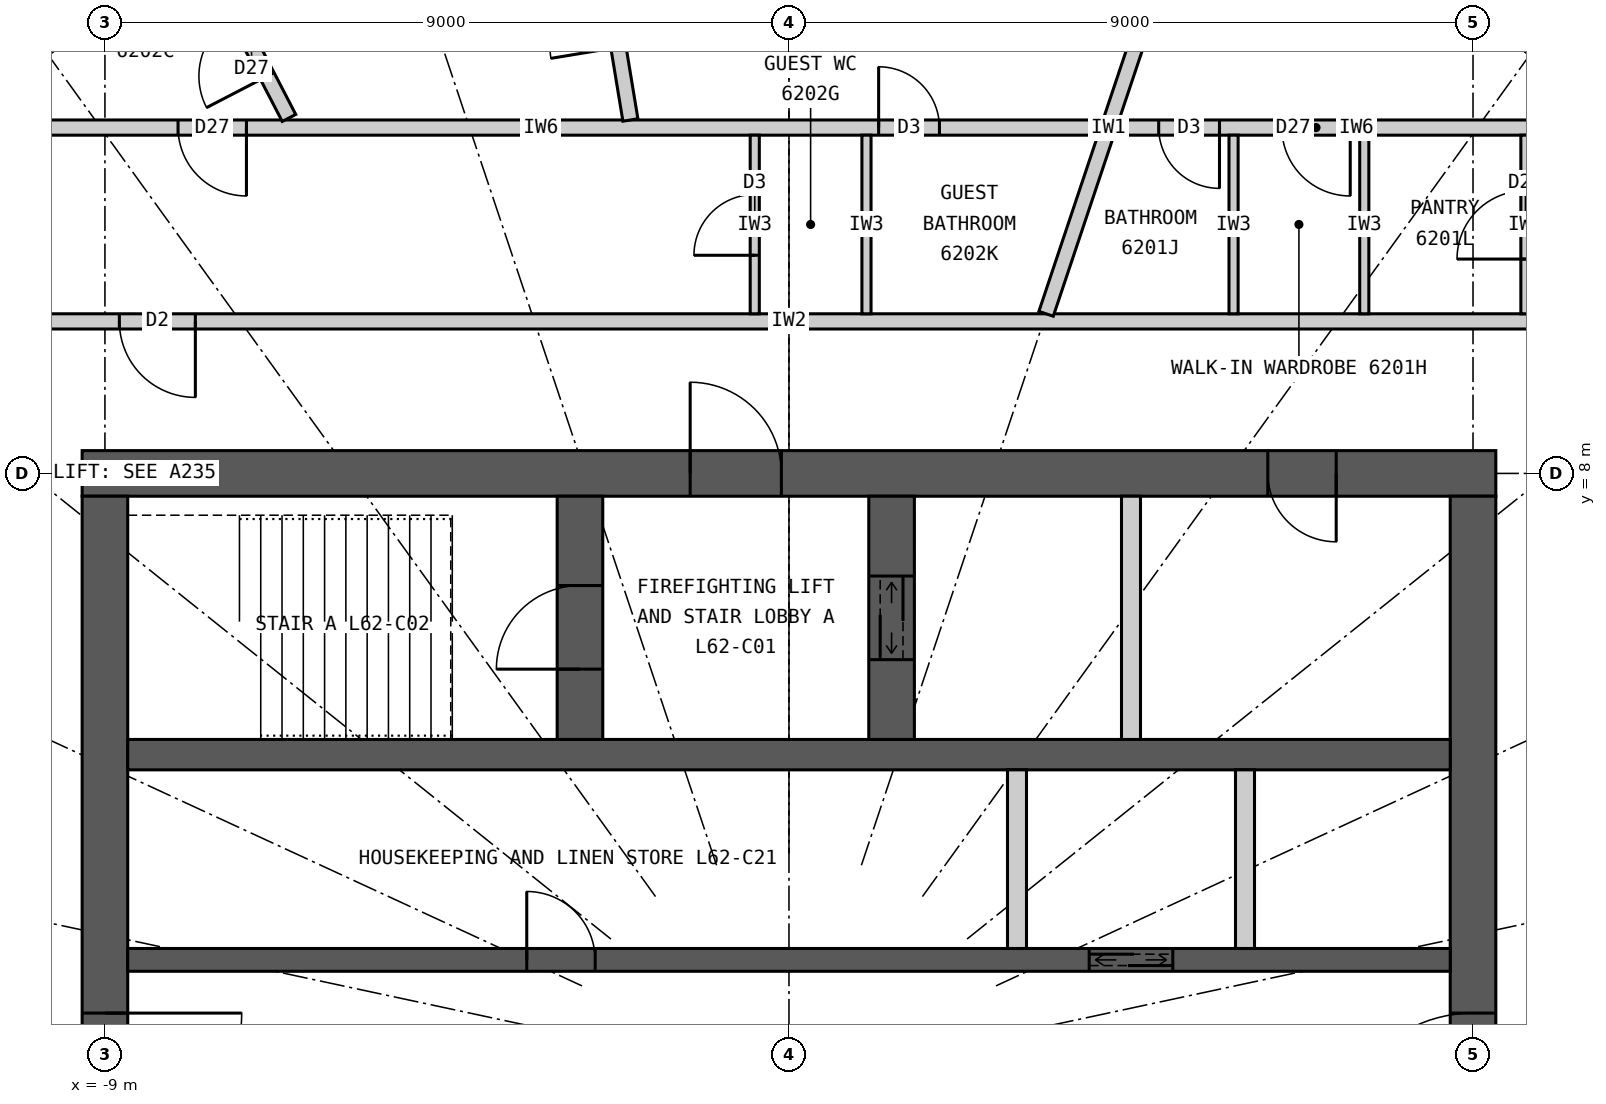
"""IFC4 building model, lengths in metres.
Left out: names, types, materials, properties, quantities, classifications, styles, units other than length and angle.
Written with IfcOpenShell. Run it as: python <this file> out.ifc"""

import sys

from ifc_helpers import new_model, si_unit, direction, frame, frame_2d, origin, origin_2d, place, context, subcontext, project, spatial, rectangle, circle, extrude, clip, halfspace, element, fill, save


model = new_model("IFC4")
c1 = context("Model", 3, precision=1e-05, world=origin(), true_north=direction((0.0, 1.0)))
c2 = subcontext(c1, "Body", "Model", "MODEL_VIEW")
j1 = project(units=[si_unit("LENGTHUNIT", "METRE"), si_unit("PLANEANGLEUNIT", "RADIAN")], contexts=[c1])
p1 = place(None, origin())
s1 = spatial("IfcSite", under=j1, at=p1, CompositionType="ELEMENT")
p2 = place(p1, origin())
s2 = spatial("IfcBuilding", under=s1, at=p2, CompositionType="ELEMENT")
p3 = place(p2, frame((0.0, 0.0, 229.2)))
s3 = spatial("IfcBuildingStorey", under=s2, at=p3, CompositionType="ELEMENT", Elevation=229.2)
for number, where, z_axis, x_axis in (
    (1, (10.019, 13.883, 0.0), (0.0, 0.0, 1.0), (1.0, 0.0, 0.0)),
    (2, (-10.019, 13.883, 0.0), (0.0, 0.0, 1.0), (1.0, 0.0, 0.0)),
):
    element("IfcColumn", number, at=place(p3, frame(where, z_axis=z_axis, x_axis=x_axis)), inside=s3, PredefinedType="COLUMN", context=c2, shape_type="Clipping", body=[
        clip(extrude(circle(Radius=0.45, at=origin_2d()), origin(), (0.0, 0.0, 1.0), 3.3), halfspace(frame((0.0, 0.0, 2.25), z_axis=(0.0, 0.0, 1.0), x_axis=(1.0, 0.0, 0.0)), False)),
    ])
p4 = place(p3, frame((-9.3, 8.0, 0.0), z_axis=(0.0, 0.0, 1.0), x_axis=(1.0, 0.0, 0.0)))
e3 = element("IfcWall", 3, at=p4, inside=s3, PredefinedType="SHEAR", context=c2, shape_type="SweptSolid", body=[
    extrude(rectangle(XDim=18.6, YDim=0.6, at=frame_2d((9.3, 0.0))), origin(), (0.0, 0.0, 1.0), 3.3),
])
p5 = place(p4, frame((8.0, 0.0, 0.0)))
e4 = element("IfcOpeningElement", 4, at=p5, cuts=e3, PredefinedType="OPENING", context=c2, shape_type="SweptSolid", body=[
    extrude(rectangle(XDim=1.2, YDim=2.2, at=frame_2d((0.6, 1.1))), frame((0.0, 0.31, 0.0), z_axis=(0.0, -1.0, 0.0), x_axis=(1.0, 0.0, 0.0)), (0.0, 0.0, 1.0), 0.62),
])
p6 = place(p4, frame((15.6, 0.0, 0.0)))
e5 = element("IfcOpeningElement", 5, at=p6, cuts=e3, PredefinedType="OPENING", context=c2, shape_type="SweptSolid", body=[
    extrude(rectangle(XDim=0.9, YDim=2.2, at=frame_2d((0.45, 1.1))), frame((0.0, 0.31, 0.0), z_axis=(0.0, -1.0, 0.0), x_axis=(1.0, 0.0, 0.0)), (0.0, 0.0, 1.0), 0.62),
])
p7 = place(p3, frame((9.0, -7.7, 0.0), z_axis=(0.0, 0.0, 1.0), x_axis=(0.0, 1.0, 0.0)))
e6 = element("IfcWall", 6, at=p7, inside=s3, PredefinedType="SHEAR", context=c2, shape_type="SweptSolid", body=[
    extrude(rectangle(XDim=15.4, YDim=0.6, at=frame_2d((7.7, 0.0))), origin(), (0.0, 0.0, 1.0), 3.3),
])
p8 = place(p7, frame((6.8, 0.0, 0.0)))
e7 = element("IfcOpeningElement", 7, at=p8, cuts=e6, PredefinedType="OPENING", context=c2, shape_type="SweptSolid", body=[
    extrude(rectangle(XDim=1.8, YDim=2.2, at=frame_2d((0.9, 1.1))), frame((0.0, 0.31, 0.0), z_axis=(0.0, -1.0, 0.0), x_axis=(1.0, 0.0, 0.0)), (0.0, 0.0, 1.0), 0.62),
])
p9 = place(p3, frame((-9.0, 7.7, 0.0), z_axis=(0.0, 0.0, 1.0), x_axis=(0.0, -1.0, 0.0)))
e8 = element("IfcWall", 8, at=p9, inside=s3, PredefinedType="SHEAR", context=c2, shape_type="SweptSolid", body=[
    extrude(rectangle(XDim=15.4, YDim=0.6, at=frame_2d((7.7, 0.0))), origin(), (0.0, 0.0, 1.0), 3.3),
])
p10 = place(p9, frame((6.8, 0.0, 0.0)))
e9 = element("IfcOpeningElement", 9, at=p10, cuts=e8, PredefinedType="OPENING", context=c2, shape_type="SweptSolid", body=[
    extrude(rectangle(XDim=1.8, YDim=2.2, at=frame_2d((0.9, 1.1))), frame((0.0, 0.31, 0.0), z_axis=(0.0, -1.0, 0.0), x_axis=(1.0, 0.0, 0.0)), (0.0, 0.0, 1.0), 0.62),
])
p11 = place(p3, frame((-8.7, 4.3, 0.0), z_axis=(0.0, 0.0, 1.0), x_axis=(1.0, 0.0, 0.0)))
e10 = element("IfcWall", 10, at=p11, inside=s3, PredefinedType="SHEAR", context=c2, shape_type="SweptSolid", body=[
    extrude(rectangle(XDim=17.4, YDim=0.4, at=frame_2d((8.7, 0.0))), origin(), (0.0, 0.0, 1.0), 3.3),
])
p12 = place(p3, frame((-8.7, 1.6, 0.0), z_axis=(0.0, 0.0, 1.0), x_axis=(1.0, 0.0, 0.0)))
e11 = element("IfcWall", 11, at=p12, inside=s3, PredefinedType="SHEAR", context=c2, shape_type="SweptSolid", body=[
    extrude(rectangle(XDim=17.4, YDim=0.3, at=frame_2d((8.7, 0.0))), origin(), (0.0, 0.0, 1.0), 3.3),
])
p13 = place(p12, frame((12.65, 0.0, 0.0)))
e12 = element("IfcOpeningElement", 12, at=p13, cuts=e11, PredefinedType="OPENING", context=c2, shape_type="SweptSolid", body=[
    extrude(rectangle(XDim=1.1, YDim=2.2, at=frame_2d((0.55, 1.1))), frame((0.0, 0.16, 0.0), z_axis=(0.0, -1.0, 0.0), x_axis=(1.0, 0.0, 0.0)), (0.0, 0.0, 1.0), 0.32),
])
p14 = place(p12, frame((5.25, 0.0, 0.0)))
e13 = element("IfcOpeningElement", 13, at=p14, cuts=e11, PredefinedType="OPENING", context=c2, shape_type="SweptSolid", body=[
    extrude(rectangle(XDim=0.9, YDim=2.2, at=frame_2d((0.45, 1.1))), frame((0.0, 0.16, 0.0), z_axis=(0.0, -1.0, 0.0), x_axis=(1.0, 0.0, 0.0)), (0.0, 0.0, 1.0), 0.32),
])
p15 = place(p3, frame((-2.75, 4.5, 0.0), z_axis=(0.0, 0.0, 1.0), x_axis=(0.0, 1.0, 0.0)))
e14 = element("IfcWall", 14, at=p15, inside=s3, PredefinedType="SHEAR", context=c2, shape_type="SweptSolid", body=[
    extrude(rectangle(XDim=3.2, YDim=0.6, at=frame_2d((1.6, 0.0))), origin(), (0.0, 0.0, 1.0), 3.3),
])
p16 = place(p15, frame((0.925, 0.0, 0.0)))
e15 = element("IfcOpeningElement", 15, at=p16, cuts=e14, PredefinedType="OPENING", context=c2, shape_type="SweptSolid", body=[
    extrude(rectangle(XDim=1.1, YDim=2.2, at=frame_2d((0.55, 1.1))), frame((0.0, 0.31, 0.0), z_axis=(0.0, -1.0, 0.0), x_axis=(1.0, 0.0, 0.0)), (0.0, 0.0, 1.0), 0.62),
])
p17 = place(p3, frame((1.35, 4.5, 0.0), z_axis=(0.0, 0.0, 1.0), x_axis=(0.0, 1.0, 0.0)))
e16 = element("IfcWall", 16, at=p17, inside=s3, PredefinedType="SHEAR", context=c2, shape_type="SweptSolid", body=[
    extrude(rectangle(XDim=3.2, YDim=0.6, at=frame_2d((1.6, 0.0))), origin(), (0.0, 0.0, 1.0), 3.3),
])
p18 = place(p17, frame((1.05, 0.0, 0.0)))
e17 = element("IfcOpeningElement", 17, at=p18, cuts=e16, PredefinedType="OPENING", context=c2, shape_type="SweptSolid", body=[
    extrude(rectangle(XDim=1.1, YDim=2.2, at=frame_2d((0.55, 1.1))), frame((0.0, 0.31, 0.0), z_axis=(0.0, -1.0, 0.0), x_axis=(1.0, 0.0, 0.0)), (0.0, 0.0, 1.0), 0.62),
])
p19 = place(p3, frame((4.5, 4.5, 0.0), z_axis=(0.0, 0.0, 1.0), x_axis=(0.0, 1.0, 0.0)))
e18 = element("IfcWall", 18, at=p19, inside=s3, PredefinedType="PARTITIONING", context=c2, shape_type="SweptSolid", body=[
    extrude(rectangle(XDim=3.2, YDim=0.25, at=frame_2d((1.6, 0.0))), origin(), (0.0, 0.0, 1.0), 3.3),
])
for number, where, z_axis, x_axis in (
    (19, (3.0, 1.75, 0.0), (0.0, 0.0, 1.0), (0.0, 1.0, 0.0)),
    (20, (6.0, 1.75, 0.0), (0.0, 0.0, 1.0), (0.0, 1.0, 0.0)),
):
    element("IfcWall", number, at=place(p3, frame(where, z_axis=z_axis, x_axis=x_axis)), inside=s3, PredefinedType="PARTITIONING", context=c2, shape_type="SweptSolid", body=[
        extrude(rectangle(XDim=2.35, YDim=0.25, at=frame_2d((1.175, 0.0))), origin(), (0.0, 0.0, 1.0), 3.3),
    ])
p20 = place(p3, frame((-11.1, 10.0, 0.0), z_axis=(0.0, 0.0, 1.0), x_axis=(1.0, 0.0, 0.0)))
e21 = element("IfcWall", 21, at=p20, inside=s3, PredefinedType="PARTITIONING", context=c2, shape_type="SweptSolid", body=[
    extrude(rectangle(XDim=22.2, YDim=0.2, at=frame_2d((11.1, 0.0))), origin(), (0.0, 0.0, 1.0), 3.05),
])
p21 = place(p20, frame((2.29, 0.0, 0.0)))
e22 = element("IfcOpeningElement", 22, at=p21, cuts=e21, PredefinedType="OPENING", context=c2, shape_type="SweptSolid", body=[
    extrude(rectangle(XDim=1.0, YDim=2.2, at=frame_2d((0.5, 1.1))), frame((0.0, 0.11, 0.0), z_axis=(0.0, -1.0, 0.0), x_axis=(1.0, 0.0, 0.0)), (0.0, 0.0, 1.0), 0.22),
])
p22 = place(p3, frame((3.383, 10.1, 0.0), z_axis=(0.0, 0.0, 1.0), x_axis=(0.317602151035, 0.948224063003, 0.0)))
e23 = element("IfcWall", 23, at=p22, inside=s3, PredefinedType="PARTITIONING", context=c2, shape_type="SweptSolid", body=[
    extrude(rectangle(XDim=5.168, YDim=0.2, at=frame_2d((2.584, 0.0))), origin(), (0.0, 0.0, 1.0), 2.15),
])
p23 = place(p3, frame((10.609, 12.55, 0.0), z_axis=(0.0, 0.0, 1.0), x_axis=(-1.0, 0.0, 0.0)))
e24 = element("IfcWall", 24, at=p23, inside=s3, PredefinedType="PARTITIONING", context=c2, shape_type="SweptSolid", body=[
    extrude(rectangle(XDim=6.284, YDim=0.2, at=frame_2d((3.142, 0.0))), origin(), (0.0, 0.0, 1.0), 3.05),
])
p24 = place(p23, frame((3.224, 0.0, 0.0)))
e25 = element("IfcOpeningElement", 25, at=p24, cuts=e24, PredefinedType="OPENING", context=c2, shape_type="SweptSolid", body=[
    extrude(rectangle(XDim=0.9, YDim=2.1, at=frame_2d((0.45, 1.05))), frame((0.0, 0.11, 0.0), z_axis=(0.0, -1.0, 0.0), x_axis=(1.0, 0.0, 0.0)), (0.0, 0.0, 1.0), 0.22),
])
p25 = place(p23, frame((4.944, 0.0, 0.0)))
e26 = element("IfcOpeningElement", 26, at=p25, cuts=e24, PredefinedType="OPENING", context=c2, shape_type="SweptSolid", body=[
    extrude(rectangle(XDim=0.8, YDim=2.1, at=frame_2d((0.4, 1.05))), frame((0.0, 0.11, 0.0), z_axis=(0.0, -1.0, 0.0), x_axis=(1.0, 0.0, 0.0)), (0.0, 0.0, 1.0), 0.22),
])
p26 = place(p3, frame((9.689, 10.1, 0.0), z_axis=(0.0, 0.0, 1.0), x_axis=(0.0, 1.0, 0.0)))
e27 = element("IfcWall", 27, at=p26, inside=s3, PredefinedType="PARTITIONING", context=c2, shape_type="SweptSolid", body=[
    extrude(rectangle(XDim=2.35, YDim=0.12, at=frame_2d((1.175, 0.0))), origin(), (0.0, 0.0, 1.0), 3.05),
])
p27 = place(p26, frame((0.72, 0.0, 0.0)))
e28 = element("IfcOpeningElement", 28, at=p27, cuts=e27, PredefinedType="OPENING", context=c2, shape_type="SweptSolid", body=[
    extrude(rectangle(XDim=0.9, YDim=2.1, at=frame_2d((0.45, 1.05))), frame((0.0, 0.07, 0.0), z_axis=(0.0, -1.0, 0.0), x_axis=(1.0, 0.0, 0.0)), (0.0, 0.0, 1.0), 0.14),
])
for number, where, z_axis, x_axis in (
    (29, (7.569, 10.1, 0.0), (0.0, 0.0, 1.0), (0.0, 1.0, 0.0)),
    (30, (5.849, 10.1, 0.0), (0.0, 0.0, 1.0), (0.0, 1.0, 0.0)),
):
    element("IfcWall", number, at=place(p3, frame(where, z_axis=z_axis, x_axis=x_axis)), inside=s3, PredefinedType="PARTITIONING", context=c2, shape_type="SweptSolid", body=[
        extrude(rectangle(XDim=2.35, YDim=0.12, at=frame_2d((1.175, 0.0))), origin(), (0.0, 0.0, 1.0), 3.05),
    ])
p28 = place(p3, frame((4.082, 12.55, 0.0), z_axis=(0.0, 0.0, 1.0), x_axis=(-1.0, 0.0, 0.0)))
e31 = element("IfcWall", 31, at=p28, inside=s3, PredefinedType="PARTITIONING", context=c2, shape_type="SweptSolid", body=[
    extrude(rectangle(XDim=14.691, YDim=0.2, at=frame_2d((7.345, 0.0))), origin(), (0.0, 0.0, 1.0), 3.05),
])
p29 = place(p28, frame((2.102, 0.0, 0.0)))
e32 = element("IfcOpeningElement", 32, at=p29, cuts=e31, PredefinedType="OPENING", context=c2, shape_type="SweptSolid", body=[
    extrude(rectangle(XDim=0.8, YDim=2.1, at=frame_2d((0.4, 1.05))), frame((0.0, 0.11, 0.0), z_axis=(0.0, -1.0, 0.0), x_axis=(1.0, 0.0, 0.0)), (0.0, 0.0, 1.0), 0.22),
])
p30 = place(p28, frame((11.22, 0.0, 0.0)))
e33 = element("IfcOpeningElement", 33, at=p30, cuts=e31, PredefinedType="OPENING", context=c2, shape_type="SweptSolid", body=[
    extrude(rectangle(XDim=0.9, YDim=2.1, at=frame_2d((0.45, 1.05))), frame((0.0, 0.11, 0.0), z_axis=(0.0, -1.0, 0.0), x_axis=(1.0, 0.0, 0.0)), (0.0, 0.0, 1.0), 0.22),
])
p31 = place(p3, frame((-2.086, 12.65, 0.0), z_axis=(0.0, 0.0, 1.0), x_axis=(-0.162664077359, 0.986681507852, 0.0)))
e34 = element("IfcWall", 34, at=p31, inside=s3, PredefinedType="PARTITIONING", context=c2, shape_type="SweptSolid", body=[
    extrude(rectangle(XDim=3.538, YDim=0.2, at=frame_2d((1.769, 0.0))), origin(), (0.0, 0.0, 1.0), 3.05),
])
p32 = place(p31, frame((0.97, 0.0, 0.0)))
e35 = element("IfcOpeningElement", 35, at=p32, cuts=e34, PredefinedType="OPENING", context=c2, shape_type="SweptSolid", body=[
    extrude(rectangle(XDim=0.9, YDim=2.1, at=frame_2d((0.45, 1.05))), frame((0.0, 0.11, 0.0), z_axis=(0.0, -1.0, 0.0), x_axis=(1.0, 0.0, 0.0)), (0.0, 0.0, 1.0), 0.22),
])
p33 = place(p3, frame((-6.578, 12.677, 0.0), z_axis=(0.0, 0.0, 1.0), x_axis=(-0.460620531465, 0.887597164255, 0.0)))
e36 = element("IfcWall", 36, at=p33, inside=s3, PredefinedType="PARTITIONING", context=c2, shape_type="SweptSolid", body=[
    extrude(rectangle(XDim=2.678, YDim=0.2, at=frame_2d((1.339, 0.0))), origin(), (0.0, 0.0, 1.0), 3.05),
])
p34 = place(p33, frame((0.62, 0.0, 0.0)))
e37 = element("IfcOpeningElement", 37, at=p34, cuts=e36, PredefinedType="OPENING", context=c2, shape_type="SweptSolid", body=[
    extrude(rectangle(XDim=0.9, YDim=2.1, at=frame_2d((0.45, 1.05))), frame((0.0, 0.11, 0.0), z_axis=(0.0, -1.0, 0.0), x_axis=(1.0, 0.0, 0.0)), (0.0, 0.0, 1.0), 0.22),
])
p35 = place(p3, frame((1.02, 10.1, 0.0), z_axis=(0.0, 0.0, 1.0), x_axis=(0.0, 1.0, 0.0)))
e38 = element("IfcWall", 38, at=p35, inside=s3, PredefinedType="PARTITIONING", context=c2, shape_type="SweptSolid", body=[
    extrude(rectangle(XDim=2.35, YDim=0.12, at=frame_2d((1.175, 0.0))), origin(), (0.0, 0.0, 1.0), 3.05),
])
p36 = place(p3, frame((-0.45, 10.1, 0.0), z_axis=(0.0, 0.0, 1.0), x_axis=(0.0, 1.0, 0.0)))
e39 = element("IfcWall", 39, at=p36, inside=s3, PredefinedType="PARTITIONING", context=c2, shape_type="SweptSolid", body=[
    extrude(rectangle(XDim=2.35, YDim=0.12, at=frame_2d((1.175, 0.0))), origin(), (0.0, 0.0, 1.0), 3.05),
])
p37 = place(p36, frame((0.77, 0.0, 0.0)))
e40 = element("IfcOpeningElement", 40, at=p37, cuts=e39, PredefinedType="OPENING", context=c2, shape_type="SweptSolid", body=[
    extrude(rectangle(XDim=0.8, YDim=2.1, at=frame_2d((0.4, 1.05))), frame((0.0, 0.07, 0.0), z_axis=(0.0, -1.0, 0.0), x_axis=(1.0, 0.0, 0.0)), (0.0, 0.0, 1.0), 0.14),
])
p38 = place(p27, origin())
e41 = element("IfcDoor", 41, at=p38, inside=s3, OperationType="SINGLE_SWING_LEFT", PredefinedType="DOOR", context=c2, shape_type="SweptSolid", body=[
    extrude(rectangle(XDim=0.9, YDim=2.1, at=frame_2d((0.45, 1.05))), frame((0.0, 0.025, 0.0), z_axis=(0.0, -1.0, 0.0), x_axis=(1.0, 0.0, 0.0)), (0.0, 0.0, 1.0), 0.05),
])
fill(e28, e41)
p39 = place(p24, origin())
e42 = element("IfcDoor", 42, at=p39, inside=s3, OperationType="SINGLE_SWING_LEFT", PredefinedType="DOOR", context=c2, shape_type="SweptSolid", body=[
    extrude(rectangle(XDim=0.9, YDim=2.1, at=frame_2d((0.45, 1.05))), frame((0.0, 0.025, 0.0), z_axis=(0.0, -1.0, 0.0), x_axis=(1.0, 0.0, 0.0)), (0.0, 0.0, 1.0), 0.05),
])
fill(e25, e42)
p40 = place(p25, origin())
e43 = element("IfcDoor", 43, at=p40, inside=s3, OperationType="SINGLE_SWING_LEFT", PredefinedType="DOOR", context=c2, shape_type="SweptSolid", body=[
    extrude(rectangle(XDim=0.8, YDim=2.1, at=frame_2d((0.4, 1.05))), frame((0.0, 0.025, 0.0), z_axis=(0.0, -1.0, 0.0), x_axis=(1.0, 0.0, 0.0)), (0.0, 0.0, 1.0), 0.05),
])
fill(e26, e43)
p41 = place(p21, origin())
e44 = element("IfcDoor", 44, at=p41, inside=s3, OperationType="SINGLE_SWING_RIGHT", PredefinedType="DOOR", context=c2, shape_type="SweptSolid", body=[
    extrude(rectangle(XDim=1.0, YDim=2.2, at=frame_2d((0.5, 1.1))), frame((0.0, 0.025, 0.0), z_axis=(0.0, -1.0, 0.0), x_axis=(1.0, 0.0, 0.0)), (0.0, 0.0, 1.0), 0.05),
])
fill(e22, e44)
p42 = place(p29, origin())
e45 = element("IfcDoor", 45, at=p42, inside=s3, OperationType="SINGLE_SWING_RIGHT", PredefinedType="DOOR", context=c2, shape_type="SweptSolid", body=[
    extrude(rectangle(XDim=0.8, YDim=2.1, at=frame_2d((0.4, 1.05))), frame((0.0, 0.025, 0.0), z_axis=(0.0, -1.0, 0.0), x_axis=(1.0, 0.0, 0.0)), (0.0, 0.0, 1.0), 0.05),
])
fill(e32, e45)
p43 = place(p37, origin())
e46 = element("IfcDoor", 46, at=p43, inside=s3, OperationType="SINGLE_SWING_LEFT", PredefinedType="DOOR", context=c2, shape_type="SweptSolid", body=[
    extrude(rectangle(XDim=0.8, YDim=2.1, at=frame_2d((0.4, 1.05))), frame((0.0, 0.025, 0.0), z_axis=(0.0, -1.0, 0.0), x_axis=(1.0, 0.0, 0.0)), (0.0, 0.0, 1.0), 0.05),
])
fill(e40, e46)
p44 = place(p30, origin())
e47 = element("IfcDoor", 47, at=p44, inside=s3, OperationType="SINGLE_SWING_LEFT", PredefinedType="DOOR", context=c2, shape_type="SweptSolid", body=[
    extrude(rectangle(XDim=0.9, YDim=2.1, at=frame_2d((0.45, 1.05))), frame((0.0, 0.025, 0.0), z_axis=(0.0, -1.0, 0.0), x_axis=(1.0, 0.0, 0.0)), (0.0, 0.0, 1.0), 0.05),
])
fill(e33, e47)
p45 = place(p34, origin())
e48 = element("IfcDoor", 48, at=p45, inside=s3, OperationType="SINGLE_SWING_LEFT", PredefinedType="DOOR", context=c2, shape_type="SweptSolid", body=[
    extrude(rectangle(XDim=0.9, YDim=2.1, at=frame_2d((0.45, 1.05))), frame((0.0, 0.025, 0.0), z_axis=(0.0, -1.0, 0.0), x_axis=(1.0, 0.0, 0.0)), (0.0, 0.0, 1.0), 0.05),
])
fill(e37, e48)
p46 = place(p5, origin())
e49 = element("IfcDoor", 49, at=p46, inside=s3, OperationType="SINGLE_SWING_LEFT", PredefinedType="DOOR", context=c2, shape_type="SweptSolid", body=[
    extrude(rectangle(XDim=1.2, YDim=2.2, at=frame_2d((0.6, 1.1))), frame((0.0, 0.025, 0.0), z_axis=(0.0, -1.0, 0.0), x_axis=(1.0, 0.0, 0.0)), (0.0, 0.0, 1.0), 0.05),
])
fill(e4, e49)
p47 = place(p16, origin())
e50 = element("IfcDoor", 50, at=p47, inside=s3, OperationType="SINGLE_SWING_LEFT", PredefinedType="DOOR", context=c2, shape_type="SweptSolid", body=[
    extrude(rectangle(XDim=1.1, YDim=2.2, at=frame_2d((0.55, 1.1))), frame((0.0, 0.025, 0.0), z_axis=(0.0, -1.0, 0.0), x_axis=(1.0, 0.0, 0.0)), (0.0, 0.0, 1.0), 0.05),
])
fill(e15, e50)
p48 = place(p18, origin())
e51 = element("IfcDoor", 51, at=p48, inside=s3, OperationType="DOUBLE_DOOR_SLIDING", PredefinedType="DOOR", context=c2, shape_type="SweptSolid", body=[
    extrude(rectangle(XDim=1.1, YDim=2.2, at=frame_2d((0.55, 1.1))), frame((0.0, 0.025, 0.0), z_axis=(0.0, -1.0, 0.0), x_axis=(1.0, 0.0, 0.0)), (0.0, 0.0, 1.0), 0.05),
])
fill(e17, e51)
p49 = place(p6, origin())
e52 = element("IfcDoor", 52, at=p49, inside=s3, OperationType="SINGLE_SWING_RIGHT", PredefinedType="DOOR", context=c2, shape_type="SweptSolid", body=[
    extrude(rectangle(XDim=0.9, YDim=2.2, at=frame_2d((0.45, 1.1))), frame((0.0, 0.025, 0.0), z_axis=(0.0, -1.0, 0.0), x_axis=(1.0, 0.0, 0.0)), (0.0, 0.0, 1.0), 0.05),
])
fill(e5, e52)
p50 = place(p13, origin())
e53 = element("IfcDoor", 53, at=p50, inside=s3, OperationType="DOUBLE_DOOR_SLIDING", PredefinedType="DOOR", context=c2, shape_type="SweptSolid", body=[
    extrude(rectangle(XDim=1.1, YDim=2.2, at=frame_2d((0.55, 1.1))), frame((0.0, 0.025, 0.0), z_axis=(0.0, -1.0, 0.0), x_axis=(1.0, 0.0, 0.0)), (0.0, 0.0, 1.0), 0.05),
])
fill(e12, e53)
p51 = place(p14, origin())
e54 = element("IfcDoor", 54, at=p51, inside=s3, OperationType="SINGLE_SWING_LEFT", PredefinedType="DOOR", context=c2, shape_type="SweptSolid", body=[
    extrude(rectangle(XDim=0.9, YDim=2.2, at=frame_2d((0.45, 1.1))), frame((0.0, 0.025, 0.0), z_axis=(0.0, -1.0, 0.0), x_axis=(1.0, 0.0, 0.0)), (0.0, 0.0, 1.0), 0.05),
])
fill(e13, e54)
p52 = place(p8, origin())
e55 = element("IfcDoor", 55, at=p52, inside=s3, OperationType="DOUBLE_DOOR_DOUBLE_SWING", PredefinedType="DOOR", context=c2, shape_type="SweptSolid", body=[
    extrude(rectangle(XDim=1.8, YDim=2.2, at=frame_2d((0.9, 1.1))), frame((0.0, 0.025, 0.0), z_axis=(0.0, -1.0, 0.0), x_axis=(1.0, 0.0, 0.0)), (0.0, 0.0, 1.0), 0.05),
])
fill(e7, e55)
p53 = place(p10, origin())
e56 = element("IfcDoor", 56, at=p53, inside=s3, OperationType="DOUBLE_DOOR_DOUBLE_SWING", PredefinedType="DOOR", context=c2, shape_type="SweptSolid", body=[
    extrude(rectangle(XDim=1.8, YDim=2.2, at=frame_2d((0.9, 1.1))), frame((0.0, 0.025, 0.0), z_axis=(0.0, -1.0, 0.0), x_axis=(1.0, 0.0, 0.0)), (0.0, 0.0, 1.0), 0.05),
])
fill(e9, e56)
save(model, sys.argv[1])
